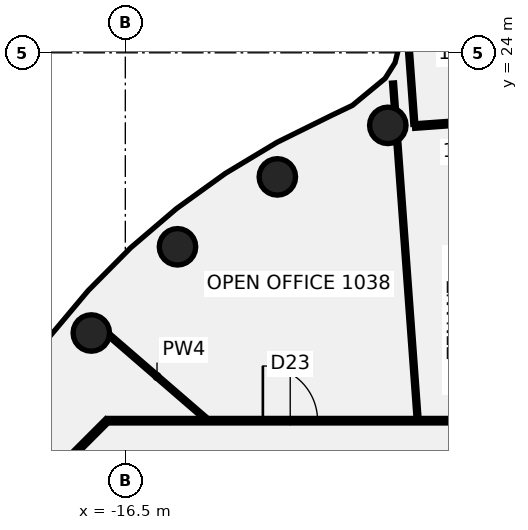
"""IFC4 building model, lengths in metres.
Left out: names, types, materials, properties, quantities, classifications, styles, units other than length and angle.
Written with IfcOpenShell. Run it as: python <this file> out.ifc"""

import sys

from ifc_helpers import new_model, si_unit, direction, frame, frame_2d, origin, origin_2d, place, context, subcontext, project, spatial, rectangle, circle, extrude, element, fill, save


model = new_model("IFC4")
c1 = context("Model", 3, precision=1e-05, world=origin(), true_north=direction((0.0, 1.0)))
c2 = subcontext(c1, "Body", "Model", "MODEL_VIEW")
j1 = project(units=[si_unit("LENGTHUNIT", "METRE"), si_unit("PLANEANGLEUNIT", "RADIAN")], contexts=[c1])
p1 = place(None, origin())
s1 = spatial("IfcSite", under=j1, at=p1, CompositionType="ELEMENT")
p2 = place(p1, origin())
s2 = spatial("IfcBuilding", under=s1, at=p2, CompositionType="ELEMENT")
p3 = place(p2, frame((0.0, 0.0, 49.0)))
s3 = spatial("IfcBuildingStorey", under=s2, at=p3, CompositionType="ELEMENT", Elevation=49.0)
for number, where, z_axis, x_axis in (
    (1, (-7.866, 21.613, -0.14), (0.0, 0.0, 1.0), (1.0, 0.0, 0.0)),
    (2, (-11.5, 19.919, -0.14), (0.0, 0.0, 1.0), (1.0, 0.0, 0.0)),
    (3, (-14.784, 17.619, -0.14), (0.0, 0.0, 1.0), (1.0, 0.0, 0.0)),
    (4, (-17.619, 14.784, -0.14), (0.0, 0.0, 1.0), (1.0, 0.0, 0.0)),
):
    element("IfcColumn", number, at=place(p3, frame(where, z_axis=z_axis, x_axis=x_axis)), inside=s3, PredefinedType="COLUMN", context=c2, shape_type="SweptSolid", body=[
        extrude(circle(Radius=0.6, at=origin_2d()), origin(), (0.0, 0.0, 1.0), 3.75),
    ])
p4 = place(p3, frame((-7.694, 23.007, 0.0), z_axis=(0.0, 0.0, 1.0), x_axis=(0.072780226335, -0.997348002783, 0.0)))
e5 = element("IfcWall", 5, at=p4, inside=s3, PredefinedType="PARTITIONING", context=c2, shape_type="SweptSolid", body=[
    extrude(rectangle(XDim=0.849, YDim=0.1, at=frame_2d((0.424, 0.0))), origin(), (0.0, 0.0, 1.0), 3.01),
])
p5 = place(p3, frame((-7.554, 21.092, 0.0), z_axis=(0.0, 0.0, 1.0), x_axis=(0.072893491176, -0.997339730956, 0.0)))
e6 = element("IfcWall", 6, at=p5, inside=s3, PredefinedType="PARTITIONING", context=c2, shape_type="SweptSolid", body=[
    extrude(rectangle(XDim=9.157, YDim=0.1, at=frame_2d((4.579, 0.0))), origin(), (0.0, 0.0, 1.0), 3.01),
])
p6 = place(p3, frame((-7.181, 24.225, 0.0), z_axis=(0.0, 0.0, 1.0), x_axis=(0.072617781565, -0.997359843688, 0.0)))
e7 = element("IfcWall", 7, at=p6, inside=s3, PredefinedType="PARTITIONING", context=c2, shape_type="SweptSolid", body=[
    extrude(rectangle(XDim=2.582, YDim=0.1, at=frame_2d((1.291, 0.0))), origin(), (0.0, 0.0, 1.0), 3.01),
])
p7 = place(p3, frame((-17.029, 14.71, 0.0), z_axis=(0.0, 0.0, 1.0), x_axis=(0.756748987317, -0.653705568429, 0.0)))
e8 = element("IfcWall", 8, at=p7, inside=s3, PredefinedType="PARTITIONING", context=c2, shape_type="SweptSolid", body=[
    extrude(rectangle(XDim=4.153, YDim=0.1, at=frame_2d((2.077, 0.0))), origin(), (0.0, 0.0, 1.0), 3.01),
])
p8 = place(p3, frame((-17.065, 11.9, 0.0), z_axis=(0.0, 0.0, 1.0), x_axis=(1.0, 0.0, 0.0)))
e9 = element("IfcWall", 9, at=p8, inside=s3, PredefinedType="PARTITIONING", context=c2, shape_type="SweptSolid", body=[
    extrude(rectangle(XDim=34.165, YDim=0.15, at=frame_2d((17.083, 0.0))), origin(), (0.0, 0.0, 1.0), 3.01),
])
p9 = place(p8, frame((16.944, 0.0, 0.0)))
e10 = element("IfcOpeningElement", 10, at=p9, cuts=e9, PredefinedType="OPENING", context=c2, shape_type="SweptSolid", body=[
    extrude(rectangle(XDim=1.8, YDim=2.1, at=frame_2d((0.9, 1.05))), frame((0.0, 0.085, 0.0), z_axis=(0.0, -1.0, 0.0), x_axis=(1.0, 0.0, 0.0)), (0.0, 0.0, 1.0), 0.17),
])
p10 = place(p8, frame((30.494, 0.0, 0.0)))
e11 = element("IfcOpeningElement", 11, at=p10, cuts=e9, PredefinedType="OPENING", context=c2, shape_type="SweptSolid", body=[
    extrude(rectangle(XDim=1.8, YDim=2.1, at=frame_2d((0.9, 1.05))), frame((0.0, 0.085, 0.0), z_axis=(0.0, -1.0, 0.0), x_axis=(1.0, 0.0, 0.0)), (0.0, 0.0, 1.0), 0.17),
])
p11 = place(p8, frame((5.089, 0.0, 0.0)))
e12 = element("IfcOpeningElement", 12, at=p11, cuts=e9, PredefinedType="OPENING", context=c2, shape_type="SweptSolid", body=[
    extrude(rectangle(XDim=1.8, YDim=2.1, at=frame_2d((0.9, 1.05))), frame((0.0, 0.085, 0.0), z_axis=(0.0, -1.0, 0.0), x_axis=(1.0, 0.0, 0.0)), (0.0, 0.0, 1.0), 0.17),
])
p12 = place(p3, frame((-6.989, 21.59, 0.0), z_axis=(0.0, 0.0, 1.0), x_axis=(0.997351140646, 0.072737213672, 0.0)))
e13 = element("IfcWall", 13, at=p12, inside=s3, PredefinedType="PARTITIONING", context=c2, shape_type="SweptSolid", body=[
    extrude(rectangle(XDim=3.9, YDim=0.15, at=frame_2d((1.95, 0.0))), origin(), (0.0, 0.0, 1.0), 3.01),
])
p13 = place(p3, frame((-18.872, 10.128, 0.0), z_axis=(0.0, 0.0, 1.0), x_axis=(0.707106781187, 0.707106781187, 0.0)))
e14 = element("IfcWall", 14, at=p13, inside=s3, PredefinedType="PARTITIONING", context=c2, shape_type="SweptSolid", body=[
    extrude(rectangle(XDim=2.505, YDim=0.15, at=frame_2d((1.253, 0.0))), origin(), (0.0, 0.0, 1.0), 3.01),
])
p14 = place(p11, origin())
e15 = element("IfcDoor", 15, at=p14, inside=s3, OperationType="DOUBLE_DOOR_SINGLE_SWING", PredefinedType="DOOR", context=c2, shape_type="SweptSolid", body=[
    extrude(rectangle(XDim=1.8, YDim=2.1, at=frame_2d((0.9, 1.05))), frame((0.0, 0.025, 0.0), z_axis=(0.0, -1.0, 0.0), x_axis=(1.0, 0.0, 0.0)), (0.0, 0.0, 1.0), 0.05),
])
fill(e12, e15)
save(model, sys.argv[1])
